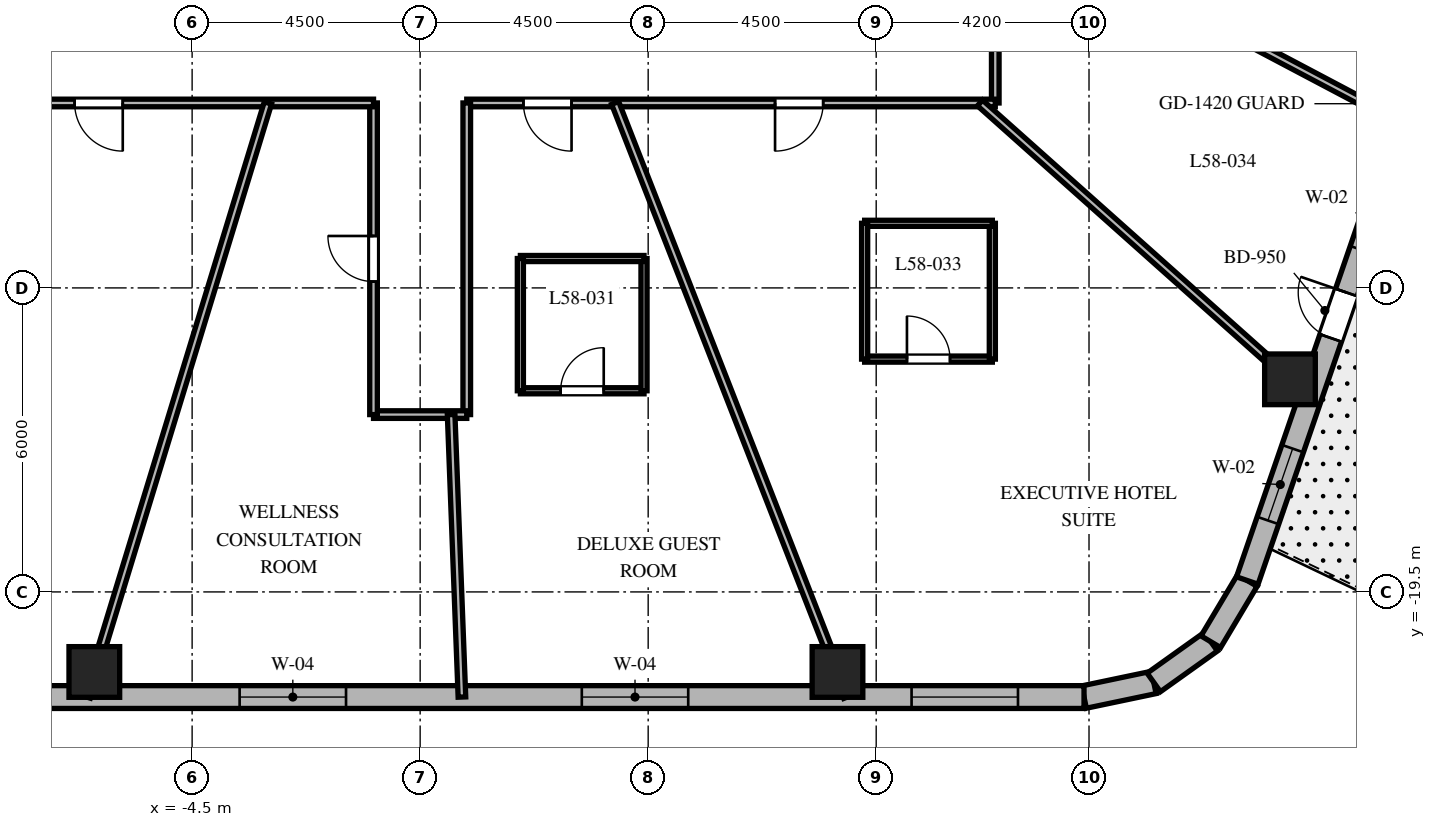
"""IFC4 building model, lengths in metres.
Left out: names, types, materials, properties, quantities, classifications, styles, units other than length and angle.
Written with IfcOpenShell. Run it as: python <this file> out.ifc"""

import sys

from ifc_helpers import new_model, si_unit, direction, frame, frame_2d, origin, origin_2d, place, context, subcontext, project, spatial, rectangle, extrude, element, fill, save


model = new_model("IFC4")
c1 = context("Model", 3, precision=1e-05, world=origin(), true_north=direction((0.0, 1.0)))
c2 = subcontext(c1, "Body", "Model", "MODEL_VIEW")
j1 = project(units=[si_unit("LENGTHUNIT", "METRE"), si_unit("PLANEANGLEUNIT", "RADIAN")], contexts=[c1])
p1 = place(None, origin())
s1 = spatial("IfcSite", under=j1, at=p1, CompositionType="ELEMENT")
p2 = place(p1, origin())
s2 = spatial("IfcBuilding", under=s1, at=p2, CompositionType="ELEMENT")
p3 = place(p2, frame((0.0, 0.0, 233.1)))
s3 = spatial("IfcBuildingStorey", under=s2, at=p3, CompositionType="ELEMENT", Elevation=233.1)
for number, where, z_axis, x_axis in (
    (1, (-6.43, -21.08, 0.0), (0.0, 0.0, 1.0), (1.0, 0.0, 0.0)),
    (2, (8.236, -21.08, 0.0), (0.0, 0.0, 1.0), (1.0, 0.0, 0.0)),
    (3, (17.166, -15.304, 0.0), (0.0, 0.0, 1.0), (1.0, 0.0, 0.0)),
):
    element("IfcColumn", number, at=place(p3, frame(where, z_axis=z_axis, x_axis=x_axis)), inside=s3, PredefinedType="COLUMN", context=c2, shape_type="SweptSolid", body=[
        extrude(rectangle(XDim=1.0, YDim=1.0, at=origin_2d()), origin(), (0.0, 0.0, 1.0), 3.8),
    ])
p4 = place(p3, frame((13.102, -21.575, 0.0), z_axis=(0.0, 0.0, 1.0), x_axis=(0.978757421505, 0.205021730188, 0.0)))
e4 = element("IfcWall", 4, at=p4, inside=s3, PredefinedType="SOLIDWALL", context=c2, shape_type="SweptSolid", body=[
    extrude(rectangle(XDim=1.406, YDim=0.45, at=frame_2d((0.703, 0.0))), origin(), (0.0, 0.0, 1.0), 3.5),
])
p5 = place(p3, frame((14.478, -21.287, 0.0), z_axis=(0.0, 0.0, 1.0), x_axis=(0.813888518617, 0.58102106611, 0.0)))
e5 = element("IfcWall", 5, at=p5, inside=s3, PredefinedType="SOLIDWALL", context=c2, shape_type="SweptSolid", body=[
    extrude(rectangle(XDim=1.383, YDim=0.45, at=frame_2d((0.691, 0.0))), origin(), (0.0, 0.0, 1.0), 3.5),
])
p6 = place(p3, frame((15.604, -20.483, 0.0), z_axis=(0.0, 0.0, 1.0), x_axis=(0.512222149036, 0.858852996756, 0.0)))
e6 = element("IfcWall", 6, at=p6, inside=s3, PredefinedType="SOLIDWALL", context=c2, shape_type="SweptSolid", body=[
    extrude(rectangle(XDim=1.406, YDim=0.45, at=frame_2d((0.703, 0.0))), origin(), (0.0, 0.0, 1.0), 3.5),
])
p7 = place(p3, frame((-11.298, -21.575, 0.0), z_axis=(0.0, 0.0, 1.0), x_axis=(1.0, 0.0, 0.0)))
e7 = element("IfcWall", 7, at=p7, inside=s3, PredefinedType="SOLIDWALL", context=c2, shape_type="SweptSolid", body=[
    extrude(rectangle(XDim=24.399, YDim=0.45, at=frame_2d((12.2, 0.0))), origin(), (0.0, 0.0, 1.0), 3.5),
])
p8 = place(p7, frame((1.304, 0.0, 0.8)))
e8 = element("IfcOpeningElement", 8, at=p8, cuts=e7, PredefinedType="OPENING", context=c2, shape_type="SweptSolid", body=[
    extrude(rectangle(XDim=2.1, YDim=1.85, at=frame_2d((1.05, 0.925))), frame((0.0, 0.235, 0.0), z_axis=(0.0, -1.0, 0.0), x_axis=(1.0, 0.0, 0.0)), (0.0, 0.0, 1.0), 0.47),
])
p9 = place(p7, frame((7.735, 0.0, 0.8)))
e9 = element("IfcOpeningElement", 9, at=p9, cuts=e7, PredefinedType="OPENING", context=c2, shape_type="SweptSolid", body=[
    extrude(rectangle(XDim=2.1, YDim=1.85, at=frame_2d((1.05, 0.925))), frame((0.0, 0.235, 0.0), z_axis=(0.0, -1.0, 0.0), x_axis=(1.0, 0.0, 0.0)), (0.0, 0.0, 1.0), 0.47),
])
p10 = place(p7, frame((14.488, 0.0, 0.8)))
e10 = element("IfcOpeningElement", 10, at=p10, cuts=e7, PredefinedType="OPENING", context=c2, shape_type="SweptSolid", body=[
    extrude(rectangle(XDim=2.1, YDim=1.85, at=frame_2d((1.05, 0.925))), frame((0.0, 0.235, 0.0), z_axis=(0.0, -1.0, 0.0), x_axis=(1.0, 0.0, 0.0)), (0.0, 0.0, 1.0), 0.47),
])
p11 = place(p7, frame((20.996, 0.0, 0.8)))
e11 = element("IfcOpeningElement", 11, at=p11, cuts=e7, PredefinedType="OPENING", context=c2, shape_type="SweptSolid", body=[
    extrude(rectangle(XDim=2.1, YDim=1.85, at=frame_2d((1.05, 0.925))), frame((0.0, 0.235, 0.0), z_axis=(0.0, -1.0, 0.0), x_axis=(1.0, 0.0, 0.0)), (0.0, 0.0, 1.0), 0.47),
])
p12 = place(p3, frame((16.324, -19.275, 0.0), z_axis=(0.0, 0.0, 1.0), x_axis=(0.325083142304, 0.945685439557, 0.0)))
e12 = element("IfcWall", 12, at=p12, inside=s3, PredefinedType="SOLIDWALL", context=c2, shape_type="SweptSolid", body=[
    extrude(rectangle(XDim=20.224, YDim=0.45, at=frame_2d((10.112, 0.0))), origin(), (0.0, 0.0, 1.0), 3.5),
])
p13 = place(p12, frame((5.062, 0.0, 0.0)))
e13 = element("IfcOpeningElement", 13, at=p13, cuts=e12, PredefinedType="OPENING", context=c2, shape_type="SweptSolid", body=[
    extrude(rectangle(XDim=0.95, YDim=2.15, at=frame_2d((0.475, 1.075))), frame((0.0, 0.235, 0.0), z_axis=(0.0, -1.0, 0.0), x_axis=(1.0, 0.0, 0.0)), (0.0, 0.0, 1.0), 0.47),
])
p14 = place(p12, frame((1.253, 0.0, 0.8)))
e14 = element("IfcOpeningElement", 14, at=p14, cuts=e12, PredefinedType="OPENING", context=c2, shape_type="SweptSolid", body=[
    extrude(rectangle(XDim=1.5, YDim=1.8, at=frame_2d((0.75, 0.9))), frame((0.0, 0.235, 0.0), z_axis=(0.0, -1.0, 0.0), x_axis=(1.0, 0.0, 0.0)), (0.0, 0.0, 1.0), 0.47),
])
p15 = place(p12, frame((6.904, 0.0, 0.8)))
e15 = element("IfcOpeningElement", 15, at=p15, cuts=e12, PredefinedType="OPENING", context=c2, shape_type="SweptSolid", body=[
    extrude(rectangle(XDim=1.5, YDim=1.8, at=frame_2d((0.75, 0.9))), frame((0.0, 0.235, 0.0), z_axis=(0.0, -1.0, 0.0), x_axis=(1.0, 0.0, 0.0)), (0.0, 0.0, 1.0), 0.47),
])
p16 = place(p12, frame((11.885, 0.0, 0.8)))
e16 = element("IfcOpeningElement", 16, at=p16, cuts=e12, PredefinedType="OPENING", context=c2, shape_type="SweptSolid", body=[
    extrude(rectangle(XDim=1.5, YDim=1.8, at=frame_2d((0.75, 0.9))), frame((0.0, 0.235, 0.0), z_axis=(0.0, -1.0, 0.0), x_axis=(1.0, 0.0, 0.0)), (0.0, 0.0, 1.0), 0.47),
])
p17 = place(p12, frame((17.418, 0.0, 0.8)))
e17 = element("IfcOpeningElement", 17, at=p17, cuts=e12, PredefinedType="OPENING", context=c2, shape_type="SweptSolid", body=[
    extrude(rectangle(XDim=1.5, YDim=1.8, at=frame_2d((0.75, 0.9))), frame((0.0, 0.235, 0.0), z_axis=(0.0, -1.0, 0.0), x_axis=(1.0, 0.0, 0.0)), (0.0, 0.0, 1.0), 0.47),
])
p18 = place(p3, frame((11.35, -4.4, 0.0), z_axis=(0.0, 0.0, 1.0), x_axis=(0.0, -1.0, 0.0)))
e18 = element("IfcWall", 18, at=p18, inside=s3, PredefinedType="PARTITIONING", context=c2, shape_type="SweptSolid", body=[
    extrude(rectangle(XDim=5.45, YDim=0.15, at=frame_2d((2.725, 0.0))), origin(), (0.0, 0.0, 1.0), 2.99),
])
p19 = place(p18, frame((2.955, 0.0, 0.0)))
e19 = element("IfcOpeningElement", 19, at=p19, cuts=e18, PredefinedType="OPENING", context=c2, shape_type="SweptSolid", body=[
    extrude(rectangle(XDim=0.9, YDim=2.03, at=frame_2d((0.45, 1.015))), frame((0.0, 0.085, 0.0), z_axis=(0.0, -1.0, 0.0), x_axis=(1.0, 0.0, 0.0)), (0.0, 0.0, 1.0), 0.17),
])
p20 = place(p3, frame((11.35, -9.85, 0.0), z_axis=(0.0, 0.0, 1.0), x_axis=(-1.0, 0.0, 0.0)))
e20 = element("IfcWall", 20, at=p20, inside=s3, PredefinedType="PARTITIONING", context=c2, shape_type="SweptSolid", body=[
    extrude(rectangle(XDim=10.43, YDim=0.15, at=frame_2d((5.215, 0.0))), origin(), (0.0, 0.0, 1.0), 2.99),
])
p21 = place(p20, frame((8.362, 0.0, 0.0)))
e21 = element("IfcOpeningElement", 21, at=p21, cuts=e20, PredefinedType="OPENING", context=c2, shape_type="SweptSolid", body=[
    extrude(rectangle(XDim=0.95, YDim=2.03, at=frame_2d((0.475, 1.015))), frame((0.0, 0.085, 0.0), z_axis=(0.0, -1.0, 0.0), x_axis=(1.0, 0.0, 0.0)), (0.0, 0.0, 1.0), 0.17),
])
p22 = place(p20, frame((3.396, 0.0, 0.0)))
e22 = element("IfcOpeningElement", 22, at=p22, cuts=e20, PredefinedType="OPENING", context=c2, shape_type="SweptSolid", body=[
    extrude(rectangle(XDim=0.95, YDim=2.03, at=frame_2d((0.475, 1.015))), frame((0.0, 0.085, 0.0), z_axis=(0.0, -1.0, 0.0), x_axis=(1.0, 0.0, 0.0)), (0.0, 0.0, 1.0), 0.17),
])
p23 = place(p3, frame((0.92, -9.85, 0.0), z_axis=(0.0, 0.0, 1.0), x_axis=(0.0, -1.0, 0.0)))
e23 = element("IfcWall", 23, at=p23, inside=s3, PredefinedType="PARTITIONING", context=c2, shape_type="SweptSolid", body=[
    extrude(rectangle(XDim=6.15, YDim=0.15, at=frame_2d((3.075, 0.0))), origin(), (0.0, 0.0, 1.0), 3.026),
])
p24 = place(p3, frame((0.92, -16.0, 0.0), z_axis=(0.0, 0.0, 1.0), x_axis=(-1.0, 0.0, 0.0)))
e24 = element("IfcWall", 24, at=p24, inside=s3, PredefinedType="PARTITIONING", context=c2, shape_type="SweptSolid", body=[
    extrude(rectangle(XDim=1.84, YDim=0.15, at=frame_2d((0.92, 0.0))), origin(), (0.0, 0.0, 1.0), 3.5),
])
p25 = place(p3, frame((-0.92, -16.0, 0.0), z_axis=(0.0, 0.0, 1.0), x_axis=(0.0, 1.0, 0.0)))
e25 = element("IfcWall", 25, at=p25, inside=s3, PredefinedType="PARTITIONING", context=c2, shape_type="SweptSolid", body=[
    extrude(rectangle(XDim=6.15, YDim=0.15, at=frame_2d((3.075, 0.0))), origin(), (0.0, 0.0, 1.0), 3.026),
])
p26 = place(p25, frame((2.625, 0.0, 0.0)))
e26 = element("IfcOpeningElement", 26, at=p26, cuts=e25, PredefinedType="OPENING", context=c2, shape_type="SweptSolid", body=[
    extrude(rectangle(XDim=0.9, YDim=2.03, at=frame_2d((0.45, 1.015))), frame((0.0, 0.085, 0.0), z_axis=(0.0, -1.0, 0.0), x_axis=(1.0, 0.0, 0.0)), (0.0, 0.0, 1.0), 0.17),
])
p27 = place(p3, frame((-0.92, -9.85, 0.0), z_axis=(0.0, 0.0, 1.0), x_axis=(-1.0, 0.0, 0.0)))
e27 = element("IfcWall", 27, at=p27, inside=s3, PredefinedType="PARTITIONING", context=c2, shape_type="SweptSolid", body=[
    extrude(rectangle(XDim=10.43, YDim=0.15, at=frame_2d((5.215, 0.0))), origin(), (0.0, 0.0, 1.0), 2.99),
])
p28 = place(p27, frame((4.949, 0.0, 0.0)))
e28 = element("IfcOpeningElement", 28, at=p28, cuts=e27, PredefinedType="OPENING", context=c2, shape_type="SweptSolid", body=[
    extrude(rectangle(XDim=0.95, YDim=2.03, at=frame_2d((0.475, 1.015))), frame((0.0, 0.085, 0.0), z_axis=(0.0, -1.0, 0.0), x_axis=(1.0, 0.0, 0.0)), (0.0, 0.0, 1.0), 0.17),
])
p29 = place(p3, frame((-3.004, -9.85, 0.0), z_axis=(0.0, 0.0, 1.0), x_axis=(-0.291775760688, -0.956486751333, 0.0)))
e29 = element("IfcWall", 29, at=p29, inside=s3, PredefinedType="PARTITIONING", context=c2, shape_type="SweptSolid", body=[
    extrude(rectangle(XDim=12.258, YDim=0.15, at=frame_2d((6.129, 0.0))), origin(), (0.0, 0.0, 1.0), 2.74),
])
p30 = place(p3, frame((0.612, -16.0, 0.0), z_axis=(0.0, 0.0, 1.0), x_axis=(0.038202877739, -0.999270003619, 0.0)))
e30 = element("IfcWall", 30, at=p30, inside=s3, PredefinedType="PARTITIONING", context=c2, shape_type="SweptSolid", body=[
    extrude(rectangle(XDim=5.579, YDim=0.15, at=frame_2d((2.79, 0.0))), origin(), (0.0, 0.0, 1.0), 2.74),
])
p31 = place(p3, frame((3.848, -9.85, 0.0), z_axis=(0.0, 0.0, 1.0), x_axis=(0.363921778212, -0.931429513889, 0.0)))
e31 = element("IfcWall", 31, at=p31, inside=s3, PredefinedType="PARTITIONING", context=c2, shape_type="SweptSolid", body=[
    extrude(rectangle(XDim=12.588, YDim=0.15, at=frame_2d((6.294, 0.0))), origin(), (0.0, 0.0, 1.0), 2.74),
])
p32 = place(p3, frame((11.048, -9.85, 0.0), z_axis=(0.0, 0.0, 1.0), x_axis=(0.746444434655, -0.665447748492, 0.0)))
e32 = element("IfcWall", 32, at=p32, inside=s3, PredefinedType="PARTITIONING", context=c2, shape_type="SweptSolid", body=[
    extrude(rectangle(XDim=8.732, YDim=0.15, at=frame_2d((4.366, 0.0))), origin(), (0.0, 0.0, 1.0), 2.74),
])
p33 = place(p3, frame((11.35, -5.999, 0.0), z_axis=(0.0, 0.0, 1.0), x_axis=(0.884112301724, -0.467274478161, 0.0)))
e33 = element("IfcWall", 33, at=p33, inside=s3, PredefinedType="PARTITIONING", context=c2, shape_type="SweptSolid", body=[
    extrude(rectangle(XDim=9.129, YDim=0.15, at=frame_2d((4.564, 0.0))), origin(), (0.0, 0.0, 1.0), 2.74),
])
p34 = place(p3, frame((1.978, -15.53, 0.0), z_axis=(0.0, 0.0, 1.0), x_axis=(1.0, 0.0, 0.0)))
e34 = element("IfcWall", 34, at=p34, inside=s3, PredefinedType="PARTITIONING", context=c2, shape_type="SweptSolid", body=[
    extrude(rectangle(XDim=2.44, YDim=0.12, at=frame_2d((1.22, 0.0))), origin(), (0.0, 0.0, 1.0), 3.5),
])
p35 = place(p34, frame((0.795, 0.0, 0.0)))
e35 = element("IfcOpeningElement", 35, at=p35, cuts=e34, PredefinedType="OPENING", context=c2, shape_type="SweptSolid", body=[
    extrude(rectangle(XDim=0.85, YDim=2.03, at=frame_2d((0.425, 1.015))), frame((0.0, 0.07, 0.0), z_axis=(0.0, -1.0, 0.0), x_axis=(1.0, 0.0, 0.0)), (0.0, 0.0, 1.0), 0.14),
])
p36 = place(p3, frame((4.418, -15.53, 0.0), z_axis=(0.0, 0.0, 1.0), x_axis=(0.0, 1.0, 0.0)))
e36 = element("IfcWall", 36, at=p36, inside=s3, PredefinedType="PARTITIONING", context=c2, shape_type="SweptSolid", body=[
    extrude(rectangle(XDim=2.61, YDim=0.12, at=frame_2d((1.305, 0.0))), origin(), (0.0, 0.0, 1.0), 3.026),
])
p37 = place(p3, frame((4.418, -12.92, 0.0), z_axis=(0.0, 0.0, 1.0), x_axis=(-1.0, 0.0, 0.0)))
e37 = element("IfcWall", 37, at=p37, inside=s3, PredefinedType="PARTITIONING", context=c2, shape_type="SweptSolid", body=[
    extrude(rectangle(XDim=2.44, YDim=0.12, at=frame_2d((1.22, 0.0))), origin(), (0.0, 0.0, 1.0), 3.5),
])
p38 = place(p3, frame((1.978, -12.92, 0.0), z_axis=(0.0, 0.0, 1.0), x_axis=(0.0, -1.0, 0.0)))
e38 = element("IfcWall", 38, at=p38, inside=s3, PredefinedType="PARTITIONING", context=c2, shape_type="SweptSolid", body=[
    extrude(rectangle(XDim=2.61, YDim=0.12, at=frame_2d((1.305, 0.0))), origin(), (0.0, 0.0, 1.0), 3.026),
])
p39 = place(p3, frame((8.772, -14.905, 0.0), z_axis=(0.0, 0.0, 1.0), x_axis=(1.0, 0.0, 0.0)))
e39 = element("IfcWall", 39, at=p39, inside=s3, PredefinedType="PARTITIONING", context=c2, shape_type="SweptSolid", body=[
    extrude(rectangle(XDim=2.52, YDim=0.12, at=frame_2d((1.26, 0.0))), origin(), (0.0, 0.0, 1.0), 3.026),
])
p40 = place(p39, frame((0.835, 0.0, 0.0)))
e40 = element("IfcOpeningElement", 40, at=p40, cuts=e39, PredefinedType="OPENING", context=c2, shape_type="SweptSolid", body=[
    extrude(rectangle(XDim=0.85, YDim=2.03, at=frame_2d((0.425, 1.015))), frame((0.0, 0.07, 0.0), z_axis=(0.0, -1.0, 0.0), x_axis=(1.0, 0.0, 0.0)), (0.0, 0.0, 1.0), 0.14),
])
p41 = place(p3, frame((11.292, -14.905, 0.0), z_axis=(0.0, 0.0, 1.0), x_axis=(0.0, 1.0, 0.0)))
e41 = element("IfcWall", 41, at=p41, inside=s3, PredefinedType="PARTITIONING", context=c2, shape_type="SweptSolid", body=[
    extrude(rectangle(XDim=2.68, YDim=0.12, at=frame_2d((1.34, 0.0))), origin(), (0.0, 0.0, 1.0), 3.026),
])
p42 = place(p3, frame((11.292, -12.225, 0.0), z_axis=(0.0, 0.0, 1.0), x_axis=(-1.0, 0.0, 0.0)))
e42 = element("IfcWall", 42, at=p42, inside=s3, PredefinedType="PARTITIONING", context=c2, shape_type="SweptSolid", body=[
    extrude(rectangle(XDim=2.52, YDim=0.12, at=frame_2d((1.26, 0.0))), origin(), (0.0, 0.0, 1.0), 2.99),
])
p43 = place(p3, frame((8.772, -12.225, 0.0), z_axis=(0.0, 0.0, 1.0), x_axis=(0.0, -1.0, 0.0)))
e43 = element("IfcWall", 43, at=p43, inside=s3, PredefinedType="PARTITIONING", context=c2, shape_type="SweptSolid", body=[
    extrude(rectangle(XDim=2.68, YDim=0.12, at=frame_2d((1.34, 0.0))), origin(), (0.0, 0.0, 1.0), 2.99),
])
p44 = place(p9, origin())
e44 = element("IfcWindow", 44, at=p44, inside=s3, PartitioningType="SINGLE_PANEL", PredefinedType="WINDOW", context=c2, shape_type="SweptSolid", body=[
    extrude(rectangle(XDim=2.1, YDim=1.85, at=frame_2d((1.05, 0.925))), frame((0.0, 0.03, 0.0), z_axis=(0.0, -1.0, 0.0), x_axis=(1.0, 0.0, 0.0)), (0.0, 0.0, 1.0), 0.06),
])
fill(e9, e44)
p45 = place(p10, origin())
e45 = element("IfcWindow", 45, at=p45, inside=s3, PartitioningType="SINGLE_PANEL", PredefinedType="WINDOW", context=c2, shape_type="SweptSolid", body=[
    extrude(rectangle(XDim=2.1, YDim=1.85, at=frame_2d((1.05, 0.925))), frame((0.0, 0.03, 0.0), z_axis=(0.0, -1.0, 0.0), x_axis=(1.0, 0.0, 0.0)), (0.0, 0.0, 1.0), 0.06),
])
fill(e10, e45)
p46 = place(p11, origin())
e46 = element("IfcWindow", 46, at=p46, inside=s3, PartitioningType="SINGLE_PANEL", PredefinedType="WINDOW", context=c2, shape_type="SweptSolid", body=[
    extrude(rectangle(XDim=2.1, YDim=1.85, at=frame_2d((1.05, 0.925))), frame((0.0, 0.03, 0.0), z_axis=(0.0, -1.0, 0.0), x_axis=(1.0, 0.0, 0.0)), (0.0, 0.0, 1.0), 0.06),
])
fill(e11, e46)
p47 = place(p13, origin())
e47 = element("IfcDoor", 47, at=p47, inside=s3, OperationType="SINGLE_SWING_RIGHT", PredefinedType="DOOR", context=c2, shape_type="SweptSolid", body=[
    extrude(rectangle(XDim=0.95, YDim=2.15, at=frame_2d((0.475, 1.075))), frame((0.0, 0.025, 0.0), z_axis=(0.0, -1.0, 0.0), x_axis=(1.0, 0.0, 0.0)), (0.0, 0.0, 1.0), 0.05),
])
fill(e13, e47)
p48 = place(p14, origin())
e48 = element("IfcWindow", 48, at=p48, inside=s3, PartitioningType="SINGLE_PANEL", PredefinedType="WINDOW", context=c2, shape_type="SweptSolid", body=[
    extrude(rectangle(XDim=1.5, YDim=1.8, at=frame_2d((0.75, 0.9))), frame((0.0, 0.03, 0.0), z_axis=(0.0, -1.0, 0.0), x_axis=(1.0, 0.0, 0.0)), (0.0, 0.0, 1.0), 0.06),
])
fill(e14, e48)
p49 = place(p28, origin())
e49 = element("IfcDoor", 49, at=p49, inside=s3, OperationType="SINGLE_SWING_LEFT", PredefinedType="DOOR", context=c2, shape_type="SweptSolid", body=[
    extrude(rectangle(XDim=0.95, YDim=2.03, at=frame_2d((0.475, 1.015))), frame((0.0, 0.025, 0.0), z_axis=(0.0, -1.0, 0.0), x_axis=(1.0, 0.0, 0.0)), (0.0, 0.0, 1.0), 0.05),
])
fill(e28, e49)
p50 = place(p26, origin())
e50 = element("IfcDoor", 50, at=p50, inside=s3, OperationType="SINGLE_SWING_RIGHT", PredefinedType="DOOR", context=c2, shape_type="SweptSolid", body=[
    extrude(rectangle(XDim=0.9, YDim=2.03, at=frame_2d((0.45, 1.015))), frame((0.0, 0.025, 0.0), z_axis=(0.0, -1.0, 0.0), x_axis=(1.0, 0.0, 0.0)), (0.0, 0.0, 1.0), 0.05),
])
fill(e26, e50)
p51 = place(p21, origin())
e51 = element("IfcDoor", 51, at=p51, inside=s3, OperationType="SINGLE_SWING_LEFT", PredefinedType="DOOR", context=c2, shape_type="SweptSolid", body=[
    extrude(rectangle(XDim=0.95, YDim=2.03, at=frame_2d((0.475, 1.015))), frame((0.0, 0.025, 0.0), z_axis=(0.0, -1.0, 0.0), x_axis=(1.0, 0.0, 0.0)), (0.0, 0.0, 1.0), 0.05),
])
fill(e21, e51)
p52 = place(p35, origin())
e52 = element("IfcDoor", 52, at=p52, inside=s3, OperationType="SINGLE_SWING_RIGHT", PredefinedType="DOOR", context=c2, shape_type="SweptSolid", body=[
    extrude(rectangle(XDim=0.85, YDim=2.03, at=frame_2d((0.425, 1.015))), frame((0.0, 0.025, 0.0), z_axis=(0.0, -1.0, 0.0), x_axis=(1.0, 0.0, 0.0)), (0.0, 0.0, 1.0), 0.05),
])
fill(e35, e52)
p53 = place(p22, origin())
e53 = element("IfcDoor", 53, at=p53, inside=s3, OperationType="SINGLE_SWING_RIGHT", PredefinedType="DOOR", context=c2, shape_type="SweptSolid", body=[
    extrude(rectangle(XDim=0.95, YDim=2.03, at=frame_2d((0.475, 1.015))), frame((0.0, 0.025, 0.0), z_axis=(0.0, -1.0, 0.0), x_axis=(1.0, 0.0, 0.0)), (0.0, 0.0, 1.0), 0.05),
])
fill(e22, e53)
p54 = place(p40, origin())
e54 = element("IfcDoor", 54, at=p54, inside=s3, OperationType="SINGLE_SWING_LEFT", PredefinedType="DOOR", context=c2, shape_type="SweptSolid", body=[
    extrude(rectangle(XDim=0.85, YDim=2.03, at=frame_2d((0.425, 1.015))), frame((0.0, 0.025, 0.0), z_axis=(0.0, -1.0, 0.0), x_axis=(1.0, 0.0, 0.0)), (0.0, 0.0, 1.0), 0.05),
])
fill(e40, e54)
save(model, sys.argv[1])
